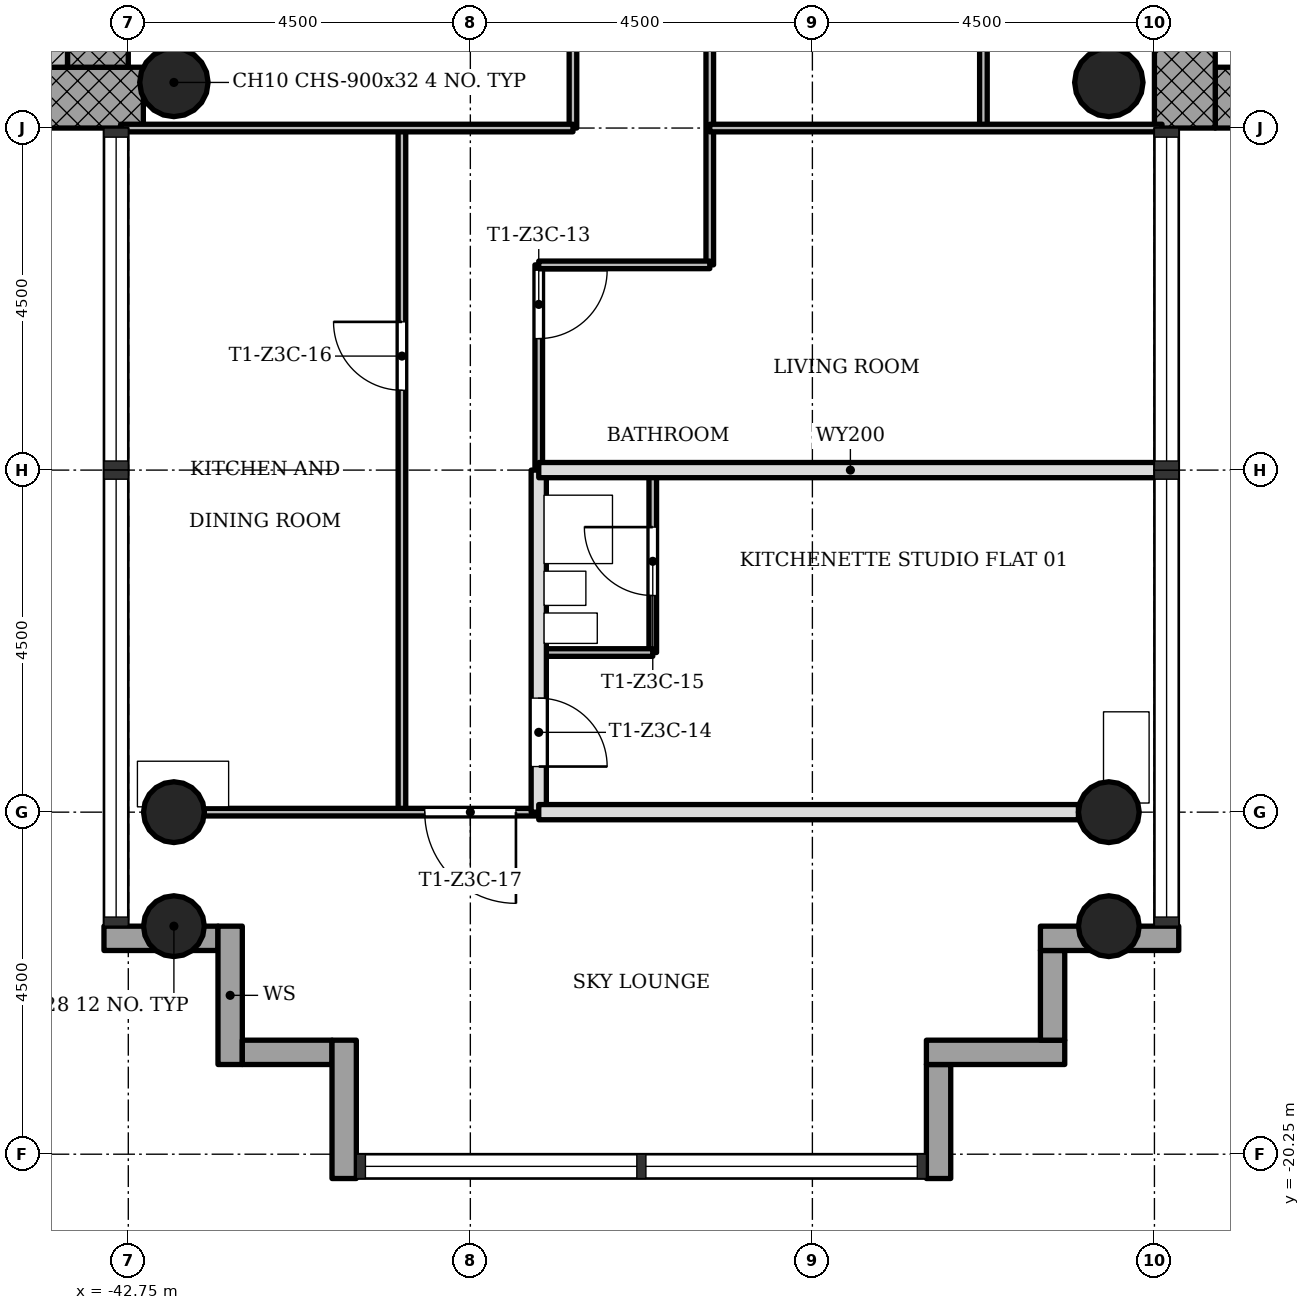
"""IFC4 building model, lengths in metres.
Left out: names, types, materials, properties, quantities, classifications, styles, units other than length and angle.
Written with IfcOpenShell. Run it as: python <this file> out.ifc"""

import sys

from ifc_helpers import new_model, si_unit, direction, frame, frame_2d, origin, origin_2d, place, context, subcontext, project, spatial, rectangle, hollow_circle, extrude, element, fill, save


model = new_model("IFC4")
c1 = context("Model", 3, precision=1e-05, world=origin(), true_north=direction((0.0, 1.0)))
c2 = subcontext(c1, "Body", "Model", "MODEL_VIEW")
j1 = project(units=[si_unit("LENGTHUNIT", "METRE"), si_unit("PLANEANGLEUNIT", "RADIAN")], contexts=[c1])
p1 = place(None, origin())
s1 = spatial("IfcSite", under=j1, at=p1, CompositionType="ELEMENT")
p2 = place(p1, origin())
s2 = spatial("IfcBuilding", under=s1, at=p2, CompositionType="ELEMENT")
p3 = place(p2, frame((0.0, 0.0, 154.1)))
s3 = spatial("IfcBuildingStorey", under=s2, at=p3, CompositionType="ELEMENT", Elevation=154.1)
p4 = place(p3, frame((-28.45, -6.35, 0.0), z_axis=(0.0, 0.0, 1.0), x_axis=(1.0, 0.0, 0.0)))
e1 = element("IfcWall", 1, at=p4, inside=s3, PredefinedType="SHEAR", context=c2, shape_type="SweptSolid", body=[
    extrude(rectangle(XDim=8.2, YDim=0.8, at=frame_2d((4.1, 0.0))), origin(), (0.0, 0.0, 1.0), 3.4),
])
p5 = place(p3, frame((-28.85, 5.95, 0.0), z_axis=(0.0, 0.0, 1.0), x_axis=(0.0, -1.0, 0.0)))
e2 = element("IfcWall", 2, at=p5, inside=s3, PredefinedType="SHEAR", context=c2, shape_type="SweptSolid", body=[
    extrude(rectangle(XDim=12.7, YDim=0.8, at=frame_2d((6.35, 0.0))), origin(), (0.0, 0.0, 1.0), 3.4),
])
p6 = place(p5, frame((5.05, 0.0, 0.0)))
e3 = element("IfcOpeningElement", 3, at=p6, cuts=e2, PredefinedType="OPENING", context=c2, shape_type="SweptSolid", body=[
    extrude(rectangle(XDim=1.8, YDim=2.1, at=frame_2d((0.9, 1.05))), frame((0.0, 0.41, 0.0), z_axis=(0.0, -1.0, 0.0), x_axis=(1.0, 0.0, 0.0)), (0.0, 0.0, 1.0), 0.82),
])
p7 = place(p3, frame((-50.95, -6.35, 0.0), z_axis=(0.0, 0.0, 1.0), x_axis=(1.0, 0.0, 0.0)))
e4 = element("IfcWall", 4, at=p7, inside=s3, PredefinedType="SHEAR", context=c2, shape_type="SweptSolid", body=[
    extrude(rectangle(XDim=8.398, YDim=0.8, at=frame_2d((4.199, 0.0))), origin(), (0.0, 0.0, 1.0), 3.4),
])
p8 = place(p3, frame((-43.15, -5.95, 0.0), z_axis=(0.0, 0.0, 1.0), x_axis=(0.0, 1.0, 0.0)))
e5 = element("IfcWall", 5, at=p8, inside=s3, PredefinedType="SHEAR", context=c2, shape_type="SweptSolid", body=[
    extrude(rectangle(XDim=12.7, YDim=0.8, at=frame_2d((6.35, 0.0))), origin(), (0.0, 0.0, 1.0), 3.4),
])
p9 = place(p8, frame((5.05, 0.0, 0.0)))
e6 = element("IfcOpeningElement", 6, at=p9, cuts=e5, PredefinedType="OPENING", context=c2, shape_type="SweptSolid", body=[
    extrude(rectangle(XDim=1.8, YDim=2.1, at=frame_2d((0.9, 1.05))), frame((0.0, 0.41, 0.0), z_axis=(0.0, -1.0, 0.0), x_axis=(1.0, 0.0, 0.0)), (0.0, 0.0, 1.0), 0.82),
])
for number, where, z_axis, x_axis in (
    (7, (-42.15, -15.75, 0.0), (0.0, 0.0, 1.0), (1.0, 0.0, 0.0)),
    (8, (-29.85, -15.75, 0.0), (0.0, 0.0, 1.0), (1.0, 0.0, 0.0)),
    (9, (-42.15, -17.25, 0.0), (0.0, 0.0, 1.0), (1.0, 0.0, 0.0)),
    (10, (-29.85, -17.25, 0.0), (0.0, 0.0, 1.0), (1.0, 0.0, 0.0)),
):
    element("IfcColumn", number, at=place(p3, frame(where, z_axis=z_axis, x_axis=x_axis)), inside=s3, PredefinedType="COLUMN", context=c2, shape_type="SweptSolid", body=[
        extrude(hollow_circle(Radius=0.4, WallThickness=0.028, at=origin_2d()), origin(), (0.0, 0.0, 1.0), 3.4),
    ])
for number, where, z_axis, x_axis in (
    (11, (-42.15, -6.15, 0.0), (0.0, 0.0, 1.0), (1.0, 0.0, 0.0)),
    (12, (-29.85, -6.15, 0.0), (0.0, 0.0, 1.0), (1.0, 0.0, 0.0)),
):
    element("IfcColumn", number, at=place(p3, frame(where, z_axis=z_axis, x_axis=x_axis)), inside=s3, PredefinedType="COLUMN", context=c2, shape_type="SweptSolid", body=[
        extrude(hollow_circle(Radius=0.45, WallThickness=0.032, at=origin_2d()), origin(), (0.0, 0.0, 1.0), 3.4),
    ])
p10 = place(p3, frame((-43.07, -17.41, -0.3), z_axis=(0.0, 0.0, 1.0), x_axis=(1.0, 0.0, 0.0)))
e13 = element("IfcWall", 13, at=p10, inside=s3, PredefinedType="STANDARD", context=c2, shape_type="SweptSolid", body=[
    extrude(rectangle(XDim=1.5, YDim=0.32, at=frame_2d((0.75, 0.0))), origin(), (0.0, 0.0, 1.0), 3.4),
])
p11 = place(p3, frame((-41.41, -17.25, -0.3), z_axis=(0.0, 0.0, 1.0), x_axis=(0.0, -1.0, 0.0)))
e14 = element("IfcWall", 14, at=p11, inside=s3, PredefinedType="STANDARD", context=c2, shape_type="SweptSolid", body=[
    extrude(rectangle(XDim=1.82, YDim=0.32, at=frame_2d((0.91, 0.0))), origin(), (0.0, 0.0, 1.0), 3.4),
])
p12 = place(p3, frame((-41.25, -18.91, -0.3), z_axis=(0.0, 0.0, 1.0), x_axis=(1.0, 0.0, 0.0)))
e15 = element("IfcWall", 15, at=p12, inside=s3, PredefinedType="STANDARD", context=c2, shape_type="SweptSolid", body=[
    extrude(rectangle(XDim=1.18, YDim=0.32, at=frame_2d((0.59, 0.0))), origin(), (0.0, 0.0, 1.0), 3.4),
])
p13 = place(p3, frame((-39.91, -18.75, -0.3), z_axis=(0.0, 0.0, 1.0), x_axis=(0.0, -1.0, 0.0)))
e16 = element("IfcWall", 16, at=p13, inside=s3, PredefinedType="STANDARD", context=c2, shape_type="SweptSolid", body=[
    extrude(rectangle(XDim=1.82, YDim=0.32, at=frame_2d((0.91, 0.0))), origin(), (0.0, 0.0, 1.0), 3.4),
])
p14 = place(p3, frame((-32.09, -20.57, -0.3), z_axis=(0.0, 0.0, 1.0), x_axis=(0.0, 1.0, 0.0)))
e17 = element("IfcWall", 17, at=p14, inside=s3, PredefinedType="STANDARD", context=c2, shape_type="SweptSolid", body=[
    extrude(rectangle(XDim=1.5, YDim=0.32, at=frame_2d((0.75, 0.0))), origin(), (0.0, 0.0, 1.0), 3.4),
])
p15 = place(p3, frame((-32.25, -18.91, -0.3), z_axis=(0.0, 0.0, 1.0), x_axis=(1.0, 0.0, 0.0)))
e18 = element("IfcWall", 18, at=p15, inside=s3, PredefinedType="STANDARD", context=c2, shape_type="SweptSolid", body=[
    extrude(rectangle(XDim=1.82, YDim=0.32, at=frame_2d((0.91, 0.0))), origin(), (0.0, 0.0, 1.0), 3.4),
])
p16 = place(p3, frame((-30.59, -18.75, -0.3), z_axis=(0.0, 0.0, 1.0), x_axis=(0.0, 1.0, 0.0)))
e19 = element("IfcWall", 19, at=p16, inside=s3, PredefinedType="STANDARD", context=c2, shape_type="SweptSolid", body=[
    extrude(rectangle(XDim=1.18, YDim=0.32, at=frame_2d((0.59, 0.0))), origin(), (0.0, 0.0, 1.0), 3.4),
])
p17 = place(p3, frame((-30.75, -17.41, -0.3), z_axis=(0.0, 0.0, 1.0), x_axis=(1.0, 0.0, 0.0)))
e20 = element("IfcWall", 20, at=p17, inside=s3, PredefinedType="STANDARD", context=c2, shape_type="SweptSolid", body=[
    extrude(rectangle(XDim=1.82, YDim=0.32, at=frame_2d((0.91, 0.0))), origin(), (0.0, 0.0, 1.0), 3.4),
])
p18 = place(p3, frame((-39.15, -15.75, 0.0), z_axis=(0.0, 0.0, 1.0), x_axis=(0.0, 1.0, 0.0)))
e21 = element("IfcWall", 21, at=p18, inside=s3, PredefinedType="PARTITIONING", context=c2, shape_type="SweptSolid", body=[
    extrude(rectangle(XDim=9.0, YDim=0.1, at=frame_2d((4.5, 0.0))), origin(), (0.0, 0.0, 1.0), 3.0),
])
p19 = place(p18, frame((5.55, 0.0, 0.0)))
e22 = element("IfcOpeningElement", 22, at=p19, cuts=e21, PredefinedType="OPENING", context=c2, shape_type="SweptSolid", body=[
    extrude(rectangle(XDim=0.9, YDim=2.1, at=frame_2d((0.45, 1.05))), frame((0.0, 0.06, 0.0), z_axis=(0.0, -1.0, 0.0), x_axis=(1.0, 0.0, 0.0)), (0.0, 0.0, 1.0), 0.12),
])
p20 = place(p3, frame((-37.35, -11.25, 0.0), z_axis=(0.0, 0.0, 1.0), x_axis=(0.0, 1.0, 0.0)))
e23 = element("IfcWall", 23, at=p20, inside=s3, PredefinedType="PARTITIONING", context=c2, shape_type="SweptSolid", body=[
    extrude(rectangle(XDim=2.7, YDim=0.1, at=frame_2d((1.35, 0.0))), origin(), (0.0, 0.0, 1.0), 3.0),
])
p21 = place(p20, frame((1.73, 0.0, 0.0)))
e24 = element("IfcOpeningElement", 24, at=p21, cuts=e23, PredefinedType="OPENING", context=c2, shape_type="SweptSolid", body=[
    extrude(rectangle(XDim=0.9, YDim=2.1, at=frame_2d((0.45, 1.05))), frame((0.0, 0.06, 0.0), z_axis=(0.0, -1.0, 0.0), x_axis=(1.0, 0.0, 0.0)), (0.0, 0.0, 1.0), 0.12),
])
p22 = place(p3, frame((-37.35, -15.75, 0.0), z_axis=(0.0, 0.0, 1.0), x_axis=(0.0, 1.0, 0.0)))
e25 = element("IfcWall", 25, at=p22, inside=s3, PredefinedType="SOLIDWALL", context=c2, shape_type="SweptSolid", body=[
    extrude(rectangle(XDim=4.5, YDim=0.2, at=frame_2d((2.25, 0.0))), origin(), (0.0, 0.0, 1.0), 3.0),
])
p23 = place(p22, frame((0.6, 0.0, 0.0)))
e26 = element("IfcOpeningElement", 26, at=p23, cuts=e25, PredefinedType="OPENING", context=c2, shape_type="SweptSolid", body=[
    extrude(rectangle(XDim=0.9, YDim=2.1, at=frame_2d((0.45, 1.05))), frame((0.0, 0.11, 0.0), z_axis=(0.0, -1.0, 0.0), x_axis=(1.0, 0.0, 0.0)), (0.0, 0.0, 1.0), 0.22),
])
p24 = place(p3, frame((-36.9, -6.75, 0.0), z_axis=(0.0, 0.0, 1.0), x_axis=(0.0, 1.0, 0.0)))
e27 = element("IfcWall", 27, at=p24, inside=s3, PredefinedType="PARTITIONING", context=c2, shape_type="SweptSolid", body=[
    extrude(rectangle(XDim=2.25, YDim=0.1, at=frame_2d((1.125, 0.0))), origin(), (0.0, 0.0, 1.0), 3.0),
])
p25 = place(p3, frame((-35.85, -13.65, 0.0), z_axis=(0.0, 0.0, 1.0), x_axis=(0.0, 1.0, 0.0)))
e28 = element("IfcWall", 28, at=p25, inside=s3, PredefinedType="PARTITIONING", context=c2, shape_type="SweptSolid", body=[
    extrude(rectangle(XDim=2.4, YDim=0.1, at=frame_2d((1.2, 0.0))), origin(), (0.0, 0.0, 1.0), 3.0),
])
p26 = place(p25, frame((0.75, 0.0, 0.0)))
e29 = element("IfcOpeningElement", 29, at=p26, cuts=e28, PredefinedType="OPENING", context=c2, shape_type="SweptSolid", body=[
    extrude(rectangle(XDim=0.9, YDim=2.1, at=frame_2d((0.45, 1.05))), frame((0.0, 0.06, 0.0), z_axis=(0.0, -1.0, 0.0), x_axis=(1.0, 0.0, 0.0)), (0.0, 0.0, 1.0), 0.12),
])
p27 = place(p3, frame((-35.1, -8.55, 0.0), z_axis=(0.0, 0.0, 1.0), x_axis=(0.0, 1.0, 0.0)))
e30 = element("IfcWall", 30, at=p27, inside=s3, PredefinedType="PARTITIONING", context=c2, shape_type="SweptSolid", body=[
    extrude(rectangle(XDim=4.05, YDim=0.1, at=frame_2d((2.025, 0.0))), origin(), (0.0, 0.0, 1.0), 3.0),
])
p28 = place(p3, frame((-31.5, -6.75, 0.0), z_axis=(0.0, 0.0, 1.0), x_axis=(0.0, 1.0, 0.0)))
e31 = element("IfcWall", 31, at=p28, inside=s3, PredefinedType="PARTITIONING", context=c2, shape_type="SweptSolid", body=[
    extrude(rectangle(XDim=5.25, YDim=0.1, at=frame_2d((2.625, 0.0))), origin(), (0.0, 0.0, 1.0), 3.0),
])
p29 = place(p28, frame((3.3, 0.0, 0.0)))
e32 = element("IfcOpeningElement", 32, at=p29, cuts=e31, PredefinedType="OPENING", context=c2, shape_type="SweptSolid", body=[
    extrude(rectangle(XDim=0.9, YDim=2.1, at=frame_2d((0.45, 1.05))), frame((0.0, 0.06, 0.0), z_axis=(0.0, -1.0, 0.0), x_axis=(1.0, 0.0, 0.0)), (0.0, 0.0, 1.0), 0.12),
])
p30 = place(p3, frame((-41.75, -15.75, 0.0), z_axis=(0.0, 0.0, 1.0), x_axis=(1.0, 0.0, 0.0)))
e33 = element("IfcWall", 33, at=p30, inside=s3, PredefinedType="PARTITIONING", context=c2, shape_type="SweptSolid", body=[
    extrude(rectangle(XDim=4.4, YDim=0.1, at=frame_2d((2.2, 0.0))), origin(), (0.0, 0.0, 1.0), 3.0),
])
p31 = place(p30, frame((2.9, 0.0, 0.0)))
e34 = element("IfcOpeningElement", 34, at=p31, cuts=e33, PredefinedType="OPENING", context=c2, shape_type="SweptSolid", body=[
    extrude(rectangle(XDim=1.2, YDim=2.1, at=frame_2d((0.6, 1.05))), frame((0.0, 0.06, 0.0), z_axis=(0.0, -1.0, 0.0), x_axis=(1.0, 0.0, 0.0)), (0.0, 0.0, 1.0), 0.12),
])
p32 = place(p3, frame((-37.35, -15.75, 0.0), z_axis=(0.0, 0.0, 1.0), x_axis=(1.0, 0.0, 0.0)))
e35 = element("IfcWall", 35, at=p32, inside=s3, PredefinedType="SOLIDWALL", context=c2, shape_type="SweptSolid", body=[
    extrude(rectangle(XDim=7.1, YDim=0.2, at=frame_2d((3.55, 0.0))), origin(), (0.0, 0.0, 1.0), 3.0),
])
p33 = place(p3, frame((-37.35, -13.65, 0.0), z_axis=(0.0, 0.0, 1.0), x_axis=(1.0, 0.0, 0.0)))
e36 = element("IfcWall", 36, at=p33, inside=s3, PredefinedType="PARTITIONING", context=c2, shape_type="SweptSolid", body=[
    extrude(rectangle(XDim=1.5, YDim=0.1, at=frame_2d((0.75, 0.0))), origin(), (0.0, 0.0, 1.0), 3.0),
])
p34 = place(p3, frame((-37.35, -11.25, 0.0), z_axis=(0.0, 0.0, 1.0), x_axis=(1.0, 0.0, 0.0)))
e37 = element("IfcWall", 37, at=p34, inside=s3, PredefinedType="SOLIDWALL", context=c2, shape_type="SweptSolid", body=[
    extrude(rectangle(XDim=8.2, YDim=0.2, at=frame_2d((4.1, 0.0))), origin(), (0.0, 0.0, 1.0), 3.0),
])
p35 = place(p3, frame((-37.35, -8.55, 0.0), z_axis=(0.0, 0.0, 1.0), x_axis=(1.0, 0.0, 0.0)))
e38 = element("IfcWall", 38, at=p35, inside=s3, PredefinedType="PARTITIONING", context=c2, shape_type="SweptSolid", body=[
    extrude(rectangle(XDim=2.25, YDim=0.1, at=frame_2d((1.125, 0.0))), origin(), (0.0, 0.0, 1.0), 3.0),
])
for number, where, z_axis, x_axis in (
    (39, (-42.85, -6.75, 0.0), (0.0, 0.0, 1.0), (1.0, 0.0, 0.0)),
    (40, (-35.1, -6.75, 0.0), (0.0, 0.0, 1.0), (1.0, 0.0, 0.0)),
):
    element("IfcWall", number, at=place(p3, frame(where, z_axis=z_axis, x_axis=x_axis)), inside=s3, PredefinedType="PARTITIONING", context=c2, shape_type="SweptSolid", body=[
        extrude(rectangle(XDim=5.95, YDim=0.1, at=frame_2d((2.975, 0.0))), origin(), (0.0, 0.0, 1.0), 3.0),
    ])
p36 = place(p3, frame((-43.75, -1.85, 0.0), z_axis=(0.0, 0.0, 1.0), x_axis=(0.0, -1.0, 0.0)))
e41 = element("IfcWall", 41, at=p36, inside=s3, PredefinedType="SHEAR", context=c2, shape_type="SweptSolid", body=[
    extrude(rectangle(XDim=4.1, YDim=0.4, at=frame_2d((2.05, 0.0))), origin(), (0.0, 0.0, 1.0), 3.4),
])
p37 = place(p21, origin())
e42 = element("IfcDoor", 42, at=p37, inside=s3, OperationType="SINGLE_SWING_RIGHT", PredefinedType="DOOR", context=c2, shape_type="SweptSolid", body=[
    extrude(rectangle(XDim=0.9, YDim=2.1, at=frame_2d((0.45, 1.05))), frame((0.0, 0.025, 0.0), z_axis=(0.0, -1.0, 0.0), x_axis=(1.0, 0.0, 0.0)), (0.0, 0.0, 1.0), 0.05),
])
fill(e24, e42)
p38 = place(p23, origin())
e43 = element("IfcDoor", 43, at=p38, inside=s3, OperationType="SINGLE_SWING_LEFT", PredefinedType="DOOR", context=c2, shape_type="SweptSolid", body=[
    extrude(rectangle(XDim=0.9, YDim=2.1, at=frame_2d((0.45, 1.05))), frame((0.0, 0.025, 0.0), z_axis=(0.0, -1.0, 0.0), x_axis=(1.0, 0.0, 0.0)), (0.0, 0.0, 1.0), 0.05),
])
fill(e26, e43)
p39 = place(p26, origin())
e44 = element("IfcDoor", 44, at=p39, inside=s3, OperationType="SINGLE_SWING_LEFT", PredefinedType="DOOR", context=c2, shape_type="SweptSolid", body=[
    extrude(rectangle(XDim=0.9, YDim=2.1, at=frame_2d((0.45, 1.05))), frame((0.0, 0.025, 0.0), z_axis=(0.0, -1.0, 0.0), x_axis=(1.0, 0.0, 0.0)), (0.0, 0.0, 1.0), 0.05),
])
fill(e29, e44)
p40 = place(p19, origin())
e45 = element("IfcDoor", 45, at=p40, inside=s3, OperationType="SINGLE_SWING_LEFT", PredefinedType="DOOR", context=c2, shape_type="SweptSolid", body=[
    extrude(rectangle(XDim=0.9, YDim=2.1, at=frame_2d((0.45, 1.05))), frame((0.0, 0.025, 0.0), z_axis=(0.0, -1.0, 0.0), x_axis=(1.0, 0.0, 0.0)), (0.0, 0.0, 1.0), 0.05),
])
fill(e22, e45)
p41 = place(p31, origin())
e46 = element("IfcDoor", 46, at=p41, inside=s3, OperationType="SINGLE_SWING_RIGHT", PredefinedType="DOOR", context=c2, shape_type="SweptSolid", body=[
    extrude(rectangle(XDim=1.2, YDim=2.1, at=frame_2d((0.6, 1.05))), frame((0.0, 0.025, 0.0), z_axis=(0.0, -1.0, 0.0), x_axis=(1.0, 0.0, 0.0)), (0.0, 0.0, 1.0), 0.05),
])
fill(e34, e46)
save(model, sys.argv[1])
